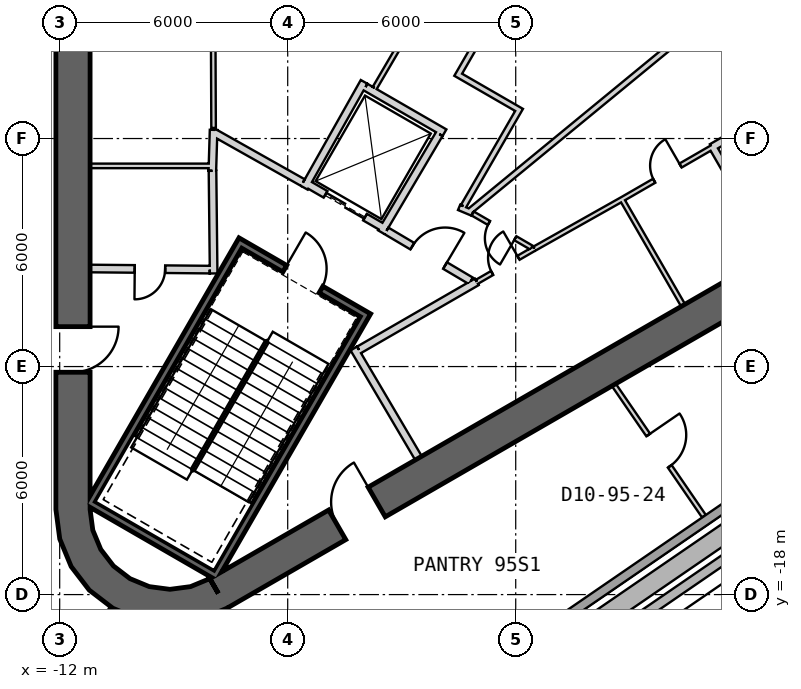
"""IFC4 building model, lengths in metres.
Left out: names, types, materials, properties, quantities, classifications, styles, units other than length and angle.
Written with IfcOpenShell. Run it as: python <this file> out.ifc"""

import sys

from ifc_helpers import new_model, si_unit, direction, frame, frame_2d, origin, place, context, subcontext, project, spatial, polyline, rectangle, outline, extrude, element, fill, save


model = new_model("IFC4")
c1 = context("Model", 3, precision=1e-05, world=origin(), true_north=direction((0.0, 1.0)))
c2 = subcontext(c1, "Body", "Model", "MODEL_VIEW")
j1 = project(units=[si_unit("LENGTHUNIT", "METRE"), si_unit("PLANEANGLEUNIT", "RADIAN")], contexts=[c1])
p1 = place(None, origin())
s1 = spatial("IfcSite", under=j1, at=p1, CompositionType="ELEMENT")
p2 = place(p1, origin())
s2 = spatial("IfcBuilding", under=s1, at=p2, CompositionType="ELEMENT")
p3 = place(p2, frame((0.0, 0.0, 420.3)))
s3 = spatial("IfcBuildingStorey", under=s2, at=p3, CompositionType="ELEMENT", Elevation=420.3)
p4 = place(p3, frame((-11.65, 15.762, 0.0), z_axis=(0.0, 0.0, 1.0), x_axis=(0.0, -1.0, 0.0)))
e1 = element("IfcWall", 1, at=p4, inside=s3, PredefinedType="SHEAR", context=c2, shape_type="SweptSolid", body=[
    extrude(rectangle(XDim=31.523, YDim=0.9, at=frame_2d((15.762, 0.0))), origin(), (0.0, 0.0, 1.0), 5.0),
])
p5 = place(p4, frame((3.612, 0.0, 0.0)))
e2 = element("IfcOpeningElement", 2, at=p5, cuts=e1, PredefinedType="OPENING", context=c2, shape_type="SweptSolid", body=[
    extrude(rectangle(XDim=1.2, YDim=2.4, at=frame_2d((0.6, 1.2))), frame((0.0, 0.46, 0.0), z_axis=(0.0, -1.0, 0.0), x_axis=(1.0, 0.0, 0.0)), (0.0, 0.0, 1.0), 0.92),
])
p6 = place(p4, frame((26.712, 0.0, 0.0)))
e3 = element("IfcOpeningElement", 3, at=p6, cuts=e1, PredefinedType="OPENING", context=c2, shape_type="SweptSolid", body=[
    extrude(rectangle(XDim=1.2, YDim=2.4, at=frame_2d((0.6, 1.2))), frame((0.0, 0.46, 0.0), z_axis=(0.0, -1.0, 0.0), x_axis=(1.0, 0.0, 0.0)), (0.0, 0.0, 1.0), 0.92),
])
p7 = place(p3, frame((-7.825, -17.97, 0.0), z_axis=(0.0, 0.0, 1.0), x_axis=(0.866028369851, 0.499994862586, 0.0)))
e4 = element("IfcWall", 4, at=p7, inside=s3, PredefinedType="SHEAR", context=c2, shape_type="SweptSolid", body=[
    extrude(rectangle(XDim=31.523, YDim=0.9, at=frame_2d((15.762, 0.0))), origin(), (0.0, 0.0, 1.0), 5.0),
])
p8 = place(p7, frame((17.862, 0.0, 0.0)))
e5 = element("IfcOpeningElement", 5, at=p8, cuts=e4, PredefinedType="OPENING", context=c2, shape_type="SweptSolid", body=[
    extrude(rectangle(XDim=1.2, YDim=2.4, at=frame_2d((0.6, 1.2))), frame((0.0, 0.46, 0.0), z_axis=(0.0, -1.0, 0.0), x_axis=(1.0, 0.0, 0.0)), (0.0, 0.0, 1.0), 0.92),
])
p9 = place(p7, frame((20.562, 0.0, 0.0)))
e6 = element("IfcOpeningElement", 6, at=p9, cuts=e4, PredefinedType="OPENING", context=c2, shape_type="SweptSolid", body=[
    extrude(rectangle(XDim=1.2, YDim=2.4, at=frame_2d((0.6, 1.2))), frame((0.0, 0.46, 0.0), z_axis=(0.0, -1.0, 0.0), x_axis=(1.0, 0.0, 0.0)), (0.0, 0.0, 1.0), 0.92),
])
p10 = place(p7, frame((26.712, 0.0, 0.0)))
e7 = element("IfcOpeningElement", 7, at=p10, cuts=e4, PredefinedType="OPENING", context=c2, shape_type="SweptSolid", body=[
    extrude(rectangle(XDim=1.2, YDim=2.4, at=frame_2d((0.6, 1.2))), frame((0.0, 0.46, 0.0), z_axis=(0.0, -1.0, 0.0), x_axis=(1.0, 0.0, 0.0)), (0.0, 0.0, 1.0), 0.92),
])
p11 = place(p7, frame((3.612, 0.0, 0.0)))
e8 = element("IfcOpeningElement", 8, at=p11, cuts=e4, PredefinedType="OPENING", context=c2, shape_type="SweptSolid", body=[
    extrude(rectangle(XDim=1.2, YDim=2.4, at=frame_2d((0.6, 1.2))), frame((0.0, 0.46, 0.0), z_axis=(0.0, -1.0, 0.0), x_axis=(1.0, 0.0, 0.0)), (0.0, 0.0, 1.0), 0.92),
])
p12 = place(p3, origin())
e9 = element("IfcWall", 9, at=p12, inside=s3, PredefinedType="SHEAR", context=c2, shape_type="SweptSolid", body=[
    extrude(outline(polyline([(-12.1, -15.762), (-11.998, -16.538), (-11.698, -17.262), (-11.221, -17.883), (-10.6, -18.36), (-9.876, -18.659), (-9.1, -18.762), (-8.323, -18.659), (-7.6, -18.36), (-8.05, -17.58), (-8.556, -17.79), (-9.1, -17.862), (-9.644, -17.79), (-10.15, -17.58), (-10.585, -17.247), (-10.919, -16.812), (-11.128, -16.305), (-11.2, -15.762), (-12.1, -15.762)])), origin(), (0.0, 0.0, 1.0), 5.0),
])
p13 = place(p3, frame((-1.01, -20.178, 0.0), z_axis=(0.0, 0.0, 1.0), x_axis=(0.824477208683, 0.565895160221, 0.0)))
e10 = element("IfcWall", 10, at=p13, inside=s3, PredefinedType="SOLIDWALL", context=c2, shape_type="SweptSolid", body=[
    extrude(rectangle(XDim=21.999, YDim=0.24, at=frame_2d((11.0, 0.0))), origin(), (0.0, 0.0, 1.0), 4.75),
])
p14 = place(p3, frame((18.521, -8.125, 0.04), z_axis=(0.0, 0.0, 1.0), x_axis=(-0.82448023265, -0.565890754447, 0.0)))
e11 = element("IfcWall", 11, at=p14, inside=s3, PredefinedType="PARAPET", context=c2, shape_type="SweptSolid", body=[
    extrude(rectangle(XDim=24.007, YDim=0.25, at=frame_2d((12.003, 0.0))), origin(), (0.0, 0.0, 1.0), 1.2),
])
p15 = place(p3, frame((17.769, -7.974, 0.04), z_axis=(0.0, 0.0, 1.0), x_axis=(-0.824477548628, -0.565894664941, 0.0)))
e12 = element("IfcWall", 12, at=p15, inside=s3, PredefinedType="PARAPET", context=c2, shape_type="SweptSolid", body=[
    extrude(rectangle(XDim=22.831, YDim=0.5, at=frame_2d((11.416, 0.0))), origin(), (0.0, 0.0, 1.0), 0.6),
])
p16 = place(p3, frame((6.795, -9.01, 0.0), z_axis=(0.0, 0.0, 1.0), x_axis=(-0.499984717929, 0.866034226713, 0.0)))
e13 = element("IfcWall", 13, at=p16, inside=s3, PredefinedType="PLUMBINGWALL", context=c2, shape_type="SweptSolid", body=[
    extrude(rectangle(XDim=3.25, YDim=0.2, at=frame_2d((1.625, 0.0))), origin(), (0.0, 0.0, 1.0), 4.75),
])
p17 = place(p3, frame((5.159, -6.236, 0.0), z_axis=(0.0, 0.0, 1.0), x_axis=(0.866036505625, 0.499980770555, 0.0)))
e14 = element("IfcWall", 14, at=p17, inside=s3, PredefinedType="PLUMBINGWALL", context=c2, shape_type="SweptSolid", body=[
    extrude(rectangle(XDim=2.7, YDim=0.2, at=frame_2d((1.35, 0.0))), origin(), (0.0, 0.0, 1.0), 4.75),
])
p18 = place(p3, frame((-3.905, -10.563, -0.25), z_axis=(0.0, 0.0, 1.0), x_axis=(-0.500012932018, -0.866017937352, 0.0)))
e15 = element("IfcWall", 15, at=p18, inside=s3, PredefinedType="SHEAR", context=c2, shape_type="SweptSolid", body=[
    extrude(rectangle(XDim=8.1, YDim=0.2, at=frame_2d((4.05, 0.0))), origin(), (0.0, 0.0, 1.0), 5.0),
])
p19 = place(p3, frame((-11.282, -15.541, -0.25), z_axis=(0.0, 0.0, 1.0), x_axis=(0.866000483506, -0.500043160704, 0.0)))
e16 = element("IfcWall", 16, at=p19, inside=s3, PredefinedType="SHEAR", context=c2, shape_type="SweptSolid", body=[
    extrude(rectangle(XDim=3.8, YDim=0.2, at=frame_2d((1.9, 0.0))), origin(), (0.0, 0.0, 1.0), 5.0),
])
p20 = place(p3, frame((-7.196, -8.663, -0.25), z_axis=(0.0, 0.0, 1.0), x_axis=(-0.499997992926, -0.866026562566, 0.0)))
e17 = element("IfcWall", 17, at=p20, inside=s3, PredefinedType="SHEAR", context=c2, shape_type="SweptSolid", body=[
    extrude(rectangle(XDim=7.9, YDim=0.2, at=frame_2d((3.95, 0.0))), origin(), (0.0, 0.0, 1.0), 5.0),
])
p21 = place(p3, frame((-4.041, -10.599, -0.25), z_axis=(0.0, 0.0, 1.0), x_axis=(-0.866047807691, 0.499961193289, 0.0)))
e18 = element("IfcWall", 18, at=p21, inside=s3, PredefinedType="SHEAR", context=c2, shape_type="SweptSolid", body=[
    extrude(rectangle(XDim=3.6, YDim=0.2, at=frame_2d((1.8, 0.0))), origin(), (0.0, 0.0, 1.0), 5.0),
])
p22 = place(p21, frame((1.25, 0.0, 0.25)))
e19 = element("IfcOpeningElement", 19, at=p22, cuts=e18, PredefinedType="OPENING", context=c2, shape_type="SweptSolid", body=[
    extrude(rectangle(XDim=1.1, YDim=2.1, at=frame_2d((0.55, 1.05))), frame((0.0, 0.11, 0.0), z_axis=(0.0, -1.0, 0.0), x_axis=(1.0, 0.0, 0.0)), (0.0, 0.0, 1.0), 0.22),
])
p23 = place(p3, frame((-3.446, -8.368, 0.0), z_axis=(0.0, 0.0, 1.0), x_axis=(-0.866024647952, 0.500001309137, 0.0)))
e20 = element("IfcWall", 20, at=p23, inside=s3, PredefinedType="PLUMBINGWALL", context=c2, shape_type="SweptSolid", body=[
    extrude(rectangle(XDim=2.4, YDim=0.2, at=frame_2d((1.2, 0.0))), origin(), (0.0, 0.0, 1.0), 4.75),
])
p24 = place(p23, frame((0.6, 0.0, 0.0)))
e21 = element("IfcOpeningElement", 21, at=p24, cuts=e20, PredefinedType="OPENING", context=c2, shape_type="SweptSolid", body=[
    extrude(rectangle(XDim=1.2, YDim=2.4, at=frame_2d((0.6, 1.2))), frame((0.0, 0.11, 0.0), z_axis=(0.0, -1.0, 0.0), x_axis=(1.0, 0.0, 0.0)), (0.0, 0.0, 1.0), 0.22),
])
p25 = place(p3, frame((-5.562, -7.296, 0.0), z_axis=(0.0, 0.0, 1.0), x_axis=(0.491358283181, 0.870957540612, 0.0)))
e22 = element("IfcWall", 22, at=p25, inside=s3, PredefinedType="PLUMBINGWALL", context=c2, shape_type="SweptSolid", body=[
    extrude(rectangle(XDim=3.2, YDim=0.2, at=frame_2d((1.6, 0.0))), origin(), (0.0, 0.0, 1.0), 4.75),
])
p26 = place(p3, frame((-3.953, -4.646, 0.0), z_axis=(0.0, 0.0, 1.0), x_axis=(0.866024647952, -0.500001309137, 0.0)))
e23 = element("IfcWall", 23, at=p26, inside=s3, PredefinedType="PLUMBINGWALL", context=c2, shape_type="SweptSolid", body=[
    extrude(rectangle(XDim=2.4, YDim=0.2, at=frame_2d((1.2, 0.0))), origin(), (0.0, 0.0, 1.0), 4.75),
])
p27 = place(p3, frame((-2.012, -5.882, 0.0), z_axis=(0.0, 0.0, 1.0), x_axis=(-0.508619639323, -0.860991325447, 0.0)))
e24 = element("IfcWall", 24, at=p27, inside=s3, PredefinedType="PLUMBINGWALL", context=c2, shape_type="SweptSolid", body=[
    extrude(rectangle(XDim=3.0, YDim=0.2, at=frame_2d((1.5, 0.0))), origin(), (0.0, 0.0, 1.0), 4.75),
])
p28 = place(p3, frame((-11.2, -6.72, 0.0), z_axis=(0.0, 0.0, 1.0), x_axis=(1.0, 0.0, 0.0)))
e25 = element("IfcWall", 25, at=p28, inside=s3, PredefinedType="PARTITIONING", context=c2, shape_type="SweptSolid", body=[
    extrude(rectangle(XDim=3.25, YDim=0.12, at=frame_2d((1.625, 0.0))), origin(), (0.0, 0.0, 1.0), 4.75),
])
p29 = place(p3, frame((-7.983, -6.85, 0.0), z_axis=(0.0, 0.0, 1.0), x_axis=(0.030803413295, 0.999525462272, 0.0)))
e26 = element("IfcWall", 26, at=p29, inside=s3, PredefinedType="PARTITIONING", context=c2, shape_type="SweptSolid", body=[
    extrude(rectangle(XDim=1.078, YDim=0.2, at=frame_2d((0.539, 0.0))), origin(), (0.0, 0.0, 1.0), 4.75),
])
p30 = place(p3, frame((-7.98, 1.35, 0.0), z_axis=(0.0, 0.0, 1.0), x_axis=(0.004177130679, -0.999991275752, 0.0)))
e27 = element("IfcWall", 27, at=p30, inside=s3, PredefinedType="PARTITIONING", context=c2, shape_type="SweptSolid", body=[
    extrude(rectangle(XDim=7.072, YDim=0.12, at=frame_2d((3.536, 0.0))), origin(), (0.0, 0.0, 1.0), 4.75),
])
p31 = place(p30, frame((3.136, 0.0, 0.0)))
e28 = element("IfcOpeningElement", 28, at=p31, cuts=e27, PredefinedType="OPENING", context=c2, shape_type="SweptSolid", body=[
    extrude(rectangle(XDim=0.8, YDim=2.1, at=frame_2d((0.4, 1.05))), frame((0.0, 0.07, 0.0), z_axis=(0.0, -1.0, 0.0), x_axis=(1.0, 0.0, 0.0)), (0.0, 0.0, 1.0), 0.14),
])
p32 = place(p3, frame((-7.949, -9.55, 0.0), z_axis=(0.0, 0.0, 1.0), x_axis=(-0.011121475088, 0.999938154483, 0.0)))
e29 = element("IfcWall", 29, at=p32, inside=s3, PredefinedType="PARTITIONING", context=c2, shape_type="SweptSolid", body=[
    extrude(rectangle(XDim=2.7, YDim=0.2, at=frame_2d((1.35, 0.0))), origin(), (0.0, 0.0, 1.0), 4.75),
])
p33 = place(p3, frame((-11.2, -9.42, 0.0), z_axis=(0.0, 0.0, 1.0), x_axis=(0.999957467379, -0.009222983926, 0.0)))
e30 = element("IfcWall", 30, at=p33, inside=s3, PredefinedType="PARTITIONING", context=c2, shape_type="SweptSolid", body=[
    extrude(rectangle(XDim=3.15, YDim=0.2, at=frame_2d((1.575, 0.0))), origin(), (0.0, 0.0, 1.0), 4.75),
])
p34 = place(p33, frame((1.175, 0.0, 0.0)))
e31 = element("IfcOpeningElement", 31, at=p34, cuts=e30, PredefinedType="OPENING", context=c2, shape_type="SweptSolid", body=[
    extrude(rectangle(XDim=0.8, YDim=2.1, at=frame_2d((0.4, 1.05))), frame((0.0, 0.11, 0.0), z_axis=(0.0, -1.0, 0.0), x_axis=(1.0, 0.0, 0.0)), (0.0, 0.0, 1.0), 0.22),
])
p35 = place(p3, frame((4.405, -10.389, 0.0), z_axis=(0.0, 0.0, 1.0), x_axis=(-0.500017246033, 0.866015446554, 0.0)))
e32 = element("IfcWall", 32, at=p35, inside=s3, PredefinedType="PARTITIONING", context=c2, shape_type="SweptSolid", body=[
    extrude(rectangle(XDim=3.25, YDim=0.12, at=frame_2d((1.625, 0.0))), origin(), (0.0, 0.0, 1.0), 4.75),
])
p36 = place(p3, frame((-4.26, -11.524, 0.0), z_axis=(0.0, 0.0, 1.0), x_axis=(0.507997497166, -0.861358544901, 0.0)))
e33 = element("IfcWall", 33, at=p36, inside=s3, PredefinedType="PARTITIONING", context=c2, shape_type="SweptSolid", body=[
    extrude(rectangle(XDim=3.35, YDim=0.2, at=frame_2d((1.675, 0.0))), origin(), (0.0, 0.0, 1.0), 4.75),
])
p37 = place(p3, frame((-1.024, -9.771, 0.0), z_axis=(0.0, 0.0, 1.0), x_axis=(-0.866029903013, -0.499992207027, 0.0)))
e34 = element("IfcWall", 34, at=p37, inside=s3, PredefinedType="PARTITIONING", context=c2, shape_type="SweptSolid", body=[
    extrude(rectangle(XDim=3.578, YDim=0.2, at=frame_2d((1.789, 0.0))), origin(), (0.0, 0.0, 1.0), 4.75),
])
p38 = place(p3, frame((0.493, -8.896, 0.0), z_axis=(0.0, 0.0, 1.0), x_axis=(0.871414386141, 0.490547620141, 0.0)))
e35 = element("IfcWall", 35, at=p38, inside=s3, PredefinedType="PARTITIONING", context=c2, shape_type="SweptSolid", body=[
    extrude(rectangle(XDim=2.671, YDim=0.12, at=frame_2d((1.335, 0.0))), origin(), (0.0, 0.0, 1.0), 4.75),
])
p39 = place(p3, frame((0.493, -8.896, 0.0), z_axis=(0.0, 0.0, 1.0), x_axis=(-0.86605557906, -0.499947731247, 0.0)))
e36 = element("IfcWall", 36, at=p39, inside=s3, PredefinedType="PARTITIONING", context=c2, shape_type="SweptSolid", body=[
    extrude(rectangle(XDim=1.751, YDim=0.12, at=frame_2d((0.875, 0.0))), origin(), (0.0, 0.0, 1.0), 4.75),
])
p40 = place(p39, frame((0.486, 0.0, 0.0)))
e37 = element("IfcOpeningElement", 37, at=p40, cuts=e36, PredefinedType="OPENING", context=c2, shape_type="SweptSolid", body=[
    extrude(rectangle(XDim=0.8, YDim=2.1, at=frame_2d((0.4, 1.05))), frame((0.0, 0.07, 0.0), z_axis=(0.0, -1.0, 0.0), x_axis=(1.0, 0.0, 0.0)), (0.0, 0.0, 1.0), 0.14),
])
p41 = place(p3, frame((2.821, -7.586, 0.0), z_axis=(0.0, 0.0, 1.0), x_axis=(0.866019956843, 0.50000943426, 0.0)))
e38 = element("IfcWall", 38, at=p41, inside=s3, PredefinedType="PARTITIONING", context=c2, shape_type="SweptSolid", body=[
    extrude(rectangle(XDim=2.7, YDim=0.12, at=frame_2d((1.35, 0.0))), origin(), (0.0, 0.0, 1.0), 4.75),
])
p42 = place(p41, frame((0.95, 0.0, 0.0)))
e39 = element("IfcOpeningElement", 39, at=p42, cuts=e38, PredefinedType="OPENING", context=c2, shape_type="SweptSolid", body=[
    extrude(rectangle(XDim=0.8, YDim=2.1, at=frame_2d((0.4, 1.05))), frame((0.0, 0.07, 0.0), z_axis=(0.0, -1.0, 0.0), x_axis=(1.0, 0.0, 0.0)), (0.0, 0.0, 1.0), 0.14),
])
p43 = place(p3, frame((-7.961, -5.831, 0.0), z_axis=(0.0, 0.0, 1.0), x_axis=(0.871354007017, -0.490654862867, 0.0)))
e40 = element("IfcWall", 40, at=p43, inside=s3, PredefinedType="PARTITIONING", context=c2, shape_type="SweptSolid", body=[
    extrude(rectangle(XDim=2.709, YDim=0.2, at=frame_2d((1.354, 0.0))), origin(), (0.0, 0.0, 1.0), 4.75),
])
p44 = place(p3, frame((-3.401, -8.43, 0.0), z_axis=(0.0, 0.0, 1.0), x_axis=(0.860630814782, -0.509229418482, 0.0)))
e41 = element("IfcWall", 41, at=p44, inside=s3, PredefinedType="PARTITIONING", context=c2, shape_type="SweptSolid", body=[
    extrude(rectangle(XDim=2.582, YDim=0.2, at=frame_2d((1.291, 0.0))), origin(), (0.0, 0.0, 1.0), 4.75),
])
p45 = place(p44, frame((0.791, 0.0, 0.0)))
e42 = element("IfcOpeningElement", 42, at=p45, cuts=e41, PredefinedType="OPENING", context=c2, shape_type="SweptSolid", body=[
    extrude(rectangle(XDim=1.0, YDim=2.1, at=frame_2d((0.5, 1.05))), frame((0.0, 0.11, 0.0), z_axis=(0.0, -1.0, 0.0), x_axis=(1.0, 0.0, 0.0)), (0.0, 0.0, 1.0), 0.22),
])
p46 = place(p3, frame((-3.711, -4.67, 0.0), z_axis=(0.0, 0.0, 1.0), x_axis=(0.505649867547, 0.862738785178, 0.0)))
e43 = element("IfcWall", 43, at=p46, inside=s3, PredefinedType="PARTITIONING", context=c2, shape_type="SweptSolid", body=[
    extrude(rectangle(XDim=4.409, YDim=0.12, at=frame_2d((2.205, 0.0))), origin(), (0.0, 0.0, 1.0), 4.75),
])
p47 = place(p3, frame((6.834, -1.302, 0.0), z_axis=(0.0, 0.0, 1.0), x_axis=(-0.772564687607, -0.634936062499, 0.0)))
e44 = element("IfcWall", 44, at=p47, inside=s3, PredefinedType="PLUMBINGWALL", context=c2, shape_type="SweptSolid", body=[
    extrude(rectangle(XDim=10.457, YDim=0.15, at=frame_2d((5.229, 0.0))), origin(), (0.0, 0.0, 1.0), 4.75),
])
p48 = place(p3, frame((-1.49, -7.812, 0.0), z_axis=(0.0, 0.0, 1.0), x_axis=(0.921780306558, -0.387712608051, 0.0)))
e45 = element("IfcWall", 45, at=p48, inside=s3, PredefinedType="PLUMBINGWALL", context=c2, shape_type="SweptSolid", body=[
    extrude(rectangle(XDim=0.38, YDim=0.15, at=frame_2d((0.19, 0.0))), origin(), (0.0, 0.0, 1.0), 4.75),
])
p49 = place(p3, frame((0.126, -5.182, 0.0), z_axis=(0.0, 0.0, 1.0), x_axis=(-0.499999580976, -0.866025645708, 0.0)))
e46 = element("IfcWall", 46, at=p49, inside=s3, PredefinedType="PLUMBINGWALL", context=c2, shape_type="SweptSolid", body=[
    extrude(rectangle(XDim=3.0, YDim=0.15, at=frame_2d((1.5, 0.0))), origin(), (0.0, 0.0, 1.0), 4.75),
])
p50 = place(p3, frame((-1.579, -4.285, 0.0), z_axis=(0.0, 0.0, 1.0), x_axis=(0.866033964044, -0.499985172903, 0.0)))
e47 = element("IfcWall", 47, at=p50, inside=s3, PredefinedType="PLUMBINGWALL", context=c2, shape_type="SweptSolid", body=[
    extrude(rectangle(XDim=1.85, YDim=0.15, at=frame_2d((0.925, 0.0))), origin(), (0.0, 0.0, 1.0), 4.75),
])
p51 = place(p3, frame((0.065, -1.587, 0.0), z_axis=(0.0, 0.0, 1.0), x_axis=(-0.499980683721, -0.866036555756, 0.0)))
e48 = element("IfcWall", 48, at=p51, inside=s3, PredefinedType="PLUMBINGWALL", context=c2, shape_type="SweptSolid", body=[
    extrude(rectangle(XDim=3.083, YDim=0.15, at=frame_2d((1.541, 0.0))), origin(), (0.0, 0.0, 1.0), 4.75),
])
p52 = place(p3, frame((-1.13, -7.974, 0.0), z_axis=(0.0, 0.0, 1.0), x_axis=(0.864961190995, -0.501838757045, 0.0)))
e49 = element("IfcWall", 49, at=p52, inside=s3, PredefinedType="PARTITIONING", context=c2, shape_type="SweptSolid", body=[
    extrude(rectangle(XDim=1.786, YDim=0.12, at=frame_2d((0.893, 0.0))), origin(), (0.0, 0.0, 1.0), 4.75),
])
p53 = place(p52, frame((0.493, 0.0, 0.0)))
e50 = element("IfcOpeningElement", 50, at=p53, cuts=e49, PredefinedType="OPENING", context=c2, shape_type="SweptSolid", body=[
    extrude(rectangle(XDim=0.8, YDim=2.1, at=frame_2d((0.4, 1.05))), frame((0.0, 0.07, 0.0), z_axis=(0.0, -1.0, 0.0), x_axis=(1.0, 0.0, 0.0)), (0.0, 0.0, 1.0), 0.14),
])
p54 = place(p3, frame((-11.819, -20.411, 0.0), z_axis=(0.0, 0.0, 1.0), x_axis=(0.500046963369, 0.865998287773, 0.0)))
e51 = element("IfcWall", 51, at=p54, inside=s3, PredefinedType="PARTITIONING", context=c2, shape_type="SweptSolid", body=[
    extrude(rectangle(XDim=2.54, YDim=0.12, at=frame_2d((1.27, 0.0))), origin(), (0.0, 0.0, 1.0), 2.52),
])
p55 = place(p3, frame((2.581, -12.481, 0.0), z_axis=(0.0, 0.0, 1.0), x_axis=(0.565895333032, -0.824477090071, 0.0)))
e52 = element("IfcWall", 52, at=p55, inside=s3, PredefinedType="PARTITIONING", context=c2, shape_type="SweptSolid", body=[
    extrude(rectangle(XDim=4.188, YDim=0.12, at=frame_2d((2.094, 0.0))), origin(), (0.0, 0.0, 1.0), 4.75),
])
p56 = place(p55, frame((1.6, 0.0, 0.0)))
e53 = element("IfcOpeningElement", 53, at=p56, cuts=e52, PredefinedType="OPENING", context=c2, shape_type="SweptSolid", body=[
    extrude(rectangle(XDim=1.0, YDim=2.1, at=frame_2d((0.5, 1.05))), frame((0.0, 0.07, 0.0), z_axis=(0.0, -1.0, 0.0), x_axis=(1.0, 0.0, 0.0)), (0.0, 0.0, 1.0), 0.14),
])
p57 = place(p22, origin())
e54 = element("IfcDoor", 54, at=p57, inside=s3, OperationType="SINGLE_SWING_RIGHT", PredefinedType="USERDEFINED", context=c2, shape_type="SweptSolid", body=[
    extrude(rectangle(XDim=1.1, YDim=2.1, at=frame_2d((0.55, 1.05))), frame((0.0, 0.025, 0.0), z_axis=(0.0, -1.0, 0.0), x_axis=(1.0, 0.0, 0.0)), (0.0, 0.0, 1.0), 0.05),
])
fill(e19, e54)
p58 = place(p45, origin())
e55 = element("IfcDoor", 55, at=p58, inside=s3, OperationType="SINGLE_SWING_RIGHT", PredefinedType="USERDEFINED", context=c2, shape_type="SweptSolid", body=[
    extrude(rectangle(XDim=1.0, YDim=2.1, at=frame_2d((0.5, 1.05))), frame((0.0, 0.025, 0.0), z_axis=(0.0, -1.0, 0.0), x_axis=(1.0, 0.0, 0.0)), (0.0, 0.0, 1.0), 0.05),
])
fill(e42, e55)
p59 = place(p24, origin())
e56 = element("IfcDoor", 56, at=p59, inside=s3, OperationType="SLIDING_TO_LEFT", PredefinedType="USERDEFINED", context=c2, shape_type="SweptSolid", body=[
    extrude(rectangle(XDim=1.2, YDim=2.4, at=frame_2d((0.6, 1.2))), frame((0.0, 0.025, 0.0), z_axis=(0.0, -1.0, 0.0), x_axis=(1.0, 0.0, 0.0)), (0.0, 0.0, 1.0), 0.05),
])
fill(e21, e56)
p60 = place(p53, origin())
e57 = element("IfcDoor", 57, at=p60, inside=s3, OperationType="SINGLE_SWING_RIGHT", PredefinedType="USERDEFINED", context=c2, shape_type="SweptSolid", body=[
    extrude(rectangle(XDim=0.8, YDim=2.1, at=frame_2d((0.4, 1.05))), frame((0.0, 0.025, 0.0), z_axis=(0.0, -1.0, 0.0), x_axis=(1.0, 0.0, 0.0)), (0.0, 0.0, 1.0), 0.05),
])
fill(e50, e57)
p61 = place(p34, origin())
e58 = element("IfcDoor", 58, at=p61, inside=s3, OperationType="SINGLE_SWING_LEFT", PredefinedType="USERDEFINED", context=c2, shape_type="SweptSolid", body=[
    extrude(rectangle(XDim=0.8, YDim=2.1, at=frame_2d((0.4, 1.05))), frame((0.0, 0.025, 0.0), z_axis=(0.0, -1.0, 0.0), x_axis=(1.0, 0.0, 0.0)), (0.0, 0.0, 1.0), 0.05),
])
fill(e31, e58)
p62 = place(p40, origin())
e59 = element("IfcDoor", 59, at=p62, inside=s3, OperationType="SINGLE_SWING_LEFT", PredefinedType="USERDEFINED", context=c2, shape_type="SweptSolid", body=[
    extrude(rectangle(XDim=0.8, YDim=2.1, at=frame_2d((0.4, 1.05))), frame((0.0, 0.025, 0.0), z_axis=(0.0, -1.0, 0.0), x_axis=(1.0, 0.0, 0.0)), (0.0, 0.0, 1.0), 0.05),
])
fill(e37, e59)
p63 = place(p42, origin())
e60 = element("IfcDoor", 60, at=p63, inside=s3, OperationType="SINGLE_SWING_RIGHT", PredefinedType="USERDEFINED", context=c2, shape_type="SweptSolid", body=[
    extrude(rectangle(XDim=0.8, YDim=2.1, at=frame_2d((0.4, 1.05))), frame((0.0, 0.025, 0.0), z_axis=(0.0, -1.0, 0.0), x_axis=(1.0, 0.0, 0.0)), (0.0, 0.0, 1.0), 0.05),
])
fill(e39, e60)
p64 = place(p56, origin())
e61 = element("IfcDoor", 61, at=p64, inside=s3, OperationType="SINGLE_SWING_LEFT", PredefinedType="NOTDEFINED", context=c2, shape_type="SweptSolid", body=[
    extrude(rectangle(XDim=1.0, YDim=2.1, at=frame_2d((0.5, 1.05))), frame((0.0, 0.025, 0.0), z_axis=(0.0, -1.0, 0.0), x_axis=(1.0, 0.0, 0.0)), (0.0, 0.0, 1.0), 0.05),
])
fill(e53, e61)
p65 = place(p6, origin())
e62 = element("IfcDoor", 62, at=p65, inside=s3, OperationType="SINGLE_SWING_LEFT", PredefinedType="USERDEFINED", context=c2, shape_type="SweptSolid", body=[
    extrude(rectangle(XDim=1.2, YDim=2.4, at=frame_2d((0.6, 1.2))), frame((0.0, 0.025, 0.0), z_axis=(0.0, -1.0, 0.0), x_axis=(1.0, 0.0, 0.0)), (0.0, 0.0, 1.0), 0.05),
])
fill(e3, e62)
p66 = place(p11, origin())
e63 = element("IfcDoor", 63, at=p66, inside=s3, OperationType="SINGLE_SWING_RIGHT", PredefinedType="USERDEFINED", context=c2, shape_type="SweptSolid", body=[
    extrude(rectangle(XDim=1.2, YDim=2.4, at=frame_2d((0.6, 1.2))), frame((0.0, 0.025, 0.0), z_axis=(0.0, -1.0, 0.0), x_axis=(1.0, 0.0, 0.0)), (0.0, 0.0, 1.0), 0.05),
])
fill(e8, e63)
save(model, sys.argv[1])
